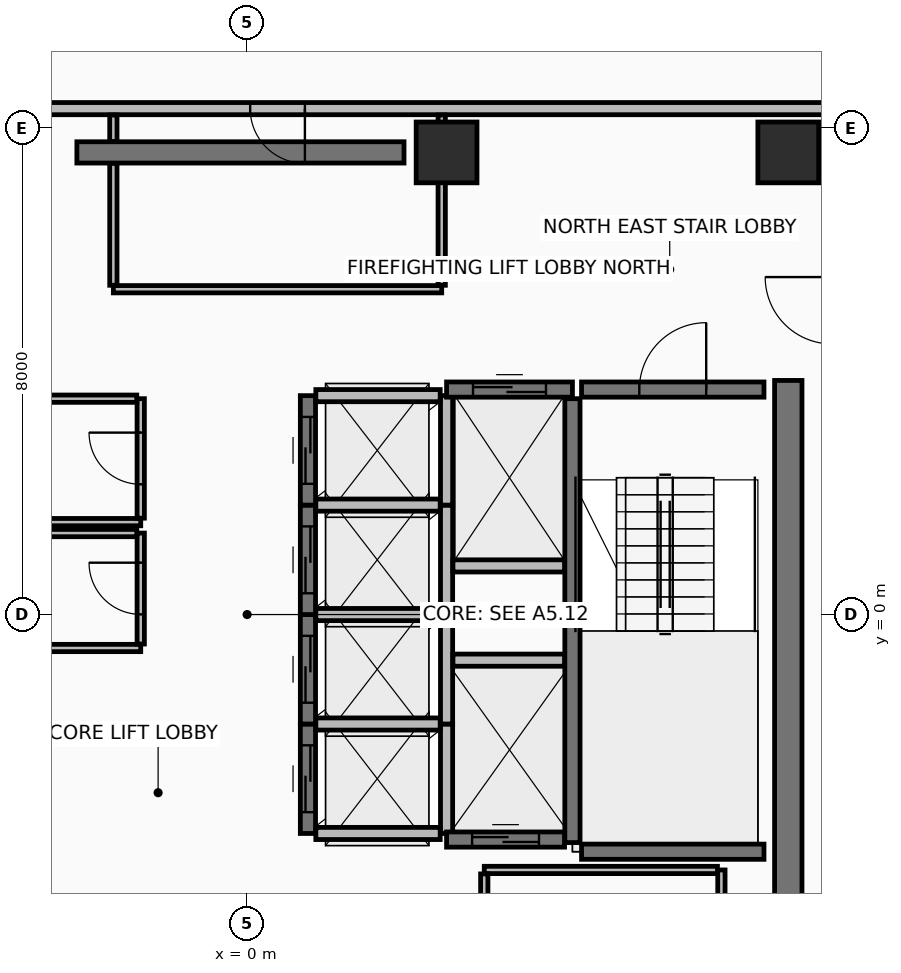
"""IFC4 building model, lengths in metres.
Left out: names, types, materials, properties, quantities, classifications, styles, units other than length and angle.
Written with IfcOpenShell. Run it as: python <this file> out.ifc"""

import sys

from ifc_helpers import new_model, si_unit, direction, frame, frame_2d, origin, origin_2d, place, context, subcontext, project, spatial, rectangle, extrude, element, fill, save


model = new_model("IFC4")
c1 = context("Model", 3, precision=1e-05, world=origin(), true_north=direction((0.0, 1.0)))
c2 = subcontext(c1, "Body", "Model", "MODEL_VIEW")
j1 = project(units=[si_unit("LENGTHUNIT", "METRE"), si_unit("PLANEANGLEUNIT", "RADIAN")], contexts=[c1])
p1 = place(None, origin())
s1 = spatial("IfcSite", under=j1, at=p1, CompositionType="ELEMENT")
p2 = place(p1, origin())
s2 = spatial("IfcBuilding", under=s1, at=p2, CompositionType="ELEMENT")
p3 = place(p2, frame((0.0, 0.0, 260.6)))
s3 = spatial("IfcBuildingStorey", under=s2, at=p3, CompositionType="ELEMENT", Elevation=260.6)
for number, where, z_axis, x_axis in (
    (1, (8.9, 7.6, 0.0), (0.0, 0.0, 1.0), (1.0, 0.0, 0.0)),
    (2, (3.28, 7.6, 0.0), (0.0, 0.0, 1.0), (1.0, 0.0, 0.0)),
):
    element("IfcColumn", number, at=place(p3, frame(where, z_axis=z_axis, x_axis=x_axis)), inside=s3, PredefinedType="COLUMN", context=c2, shape_type="SweptSolid", body=[
        extrude(rectangle(XDim=1.0, YDim=1.0, at=origin_2d()), origin(), (0.0, 0.0, 1.0), 3.6),
    ])
p4 = place(p3, frame((-2.8, 7.6, 0.0), z_axis=(0.0, 0.0, 1.0), x_axis=(1.0, 0.0, 0.0)))
e3 = element("IfcWall", 3, at=p4, inside=s3, PredefinedType="SHEAR", context=c2, shape_type="SweptSolid", body=[
    extrude(rectangle(XDim=5.38, YDim=0.35, at=frame_2d((2.69, 0.0))), origin(), (0.0, 0.0, 1.0), 3.42),
])
p5 = place(p3, frame((8.9, -6.85, 0.0), z_axis=(0.0, 0.0, 1.0), x_axis=(0.0, 1.0, 0.0)))
e4 = element("IfcWall", 4, at=p5, inside=s3, PredefinedType="SHEAR", context=c2, shape_type="SweptSolid", body=[
    extrude(rectangle(XDim=10.7, YDim=0.45, at=frame_2d((5.35, 0.0))), origin(), (0.0, 0.0, 1.0), 3.42),
])
p6 = place(p3, frame((9.62, 8.32, 0.0), z_axis=(0.0, 0.0, 1.0), x_axis=(-1.0, 0.0, 0.0)))
e5 = element("IfcWall", 5, at=p6, inside=s3, PredefinedType="PARTITIONING", context=c2, shape_type="SweptSolid", body=[
    extrude(rectangle(XDim=19.24, YDim=0.2, at=frame_2d((9.62, 0.0))), origin(), (0.0, 0.0, 1.0), 2.915),
])
p7 = place(p6, frame((8.67, 0.0, 0.0)))
e6 = element("IfcOpeningElement", 6, at=p7, cuts=e5, PredefinedType="OPENING", context=c2, shape_type="SweptSolid", body=[
    extrude(rectangle(XDim=0.9, YDim=2.1, at=frame_2d((0.45, 1.05))), frame((0.0, 0.11, 0.0), z_axis=(0.0, -1.0, 0.0), x_axis=(1.0, 0.0, 0.0)), (0.0, 0.0, 1.0), 0.22),
])
p8 = place(p6, frame((14.22, 0.0, 0.0)))
e7 = element("IfcOpeningElement", 7, at=p8, cuts=e5, PredefinedType="OPENING", context=c2, shape_type="SweptSolid", body=[
    extrude(rectangle(XDim=0.9, YDim=2.1, at=frame_2d((0.45, 1.05))), frame((0.0, 0.11, 0.0), z_axis=(0.0, -1.0, 0.0), x_axis=(1.0, 0.0, 0.0)), (0.0, 0.0, 1.0), 0.22),
])
p9 = place(p3, frame((5.35, -3.75, 0.0), z_axis=(0.0, 0.0, 1.0), x_axis=(0.0, 1.0, 0.0)))
e8 = element("IfcWall", 8, at=p9, inside=s3, PredefinedType="SHEAR", context=c2, shape_type="SweptSolid", body=[
    extrude(rectangle(XDim=7.3, YDim=0.25, at=frame_2d((3.65, 0.0))), origin(), (0.0, 0.0, 1.0), 3.42),
])
p10 = place(p3, frame((5.5, 3.7, 0.0), z_axis=(0.0, 0.0, 1.0), x_axis=(1.0, 0.0, 0.0)))
e9 = element("IfcWall", 9, at=p10, inside=s3, PredefinedType="SHEAR", context=c2, shape_type="SweptSolid", body=[
    extrude(rectangle(XDim=3.0, YDim=0.25, at=frame_2d((1.5, 0.0))), origin(), (0.0, 0.0, 1.0), 3.42),
])
p11 = place(p10, frame((0.95, 0.0, 0.0)))
e10 = element("IfcOpeningElement", 10, at=p11, cuts=e9, PredefinedType="OPENING", context=c2, shape_type="SweptSolid", body=[
    extrude(rectangle(XDim=1.1, YDim=2.15, at=frame_2d((0.55, 1.075))), frame((0.0, 0.135, 0.0), z_axis=(0.0, -1.0, 0.0), x_axis=(1.0, 0.0, 0.0)), (0.0, 0.0, 1.0), 0.27),
])
p12 = place(p3, frame((5.5, -3.9, 0.0), z_axis=(0.0, 0.0, 1.0), x_axis=(1.0, 0.0, 0.0)))
e11 = element("IfcWall", 11, at=p12, inside=s3, PredefinedType="SHEAR", context=c2, shape_type="SweptSolid", body=[
    extrude(rectangle(XDim=3.0, YDim=0.25, at=frame_2d((1.5, 0.0))), origin(), (0.0, 0.0, 1.0), 3.42),
])
p13 = place(p3, frame((1.0, -3.6, 0.0), z_axis=(0.0, 0.0, 1.0), x_axis=(0.0, 1.0, 0.0)))
e12 = element("IfcWall", 12, at=p13, inside=s3, PredefinedType="SHEAR", context=c2, shape_type="SweptSolid", body=[
    extrude(rectangle(XDim=1.8, YDim=0.25, at=frame_2d((0.9, 0.0))), origin(), (0.0, 0.0, 1.0), 3.42),
])
p14 = place(p13, frame((0.35, 0.0, 0.0)))
e13 = element("IfcOpeningElement", 13, at=p14, cuts=e12, PredefinedType="OPENING", context=c2, shape_type="SweptSolid", body=[
    extrude(rectangle(XDim=1.1, YDim=2.2, at=frame_2d((0.55, 1.1))), frame((0.0, 0.135, 0.0), z_axis=(0.0, -1.0, 0.0), x_axis=(1.0, 0.0, 0.0)), (0.0, 0.0, 1.0), 0.27),
])
p15 = place(p3, frame((3.28, -3.6, 0.0), z_axis=(0.0, 0.0, 1.0), x_axis=(0.0, 1.0, 0.0)))
e14 = element("IfcWall", 14, at=p15, inside=s3, PredefinedType="PARTITIONING", context=c2, shape_type="SweptSolid", body=[
    extrude(rectangle(XDim=1.8, YDim=0.2, at=frame_2d((0.9, 0.0))), origin(), (0.0, 0.0, 1.0), 3.42),
])
for number, where, z_axis, x_axis in (
    (15, (1.13, -3.6, 0.0), (0.0, 0.0, 1.0), (1.0, 0.0, 0.0)),
    (16, (1.13, -1.8, 0.0), (0.0, 0.0, 1.0), (1.0, 0.0, 0.0)),
):
    element("IfcWall", number, at=place(p3, frame(where, z_axis=z_axis, x_axis=x_axis)), inside=s3, PredefinedType="PARTITIONING", context=c2, shape_type="SweptSolid", body=[
        extrude(rectangle(XDim=2.045, YDim=0.2, at=frame_2d((1.022, 0.0))), origin(), (0.0, 0.0, 1.0), 3.42),
    ])
p16 = place(p3, frame((1.0, -1.8, 0.0), z_axis=(0.0, 0.0, 1.0), x_axis=(0.0, 1.0, 0.0)))
e17 = element("IfcWall", 17, at=p16, inside=s3, PredefinedType="SHEAR", context=c2, shape_type="SweptSolid", body=[
    extrude(rectangle(XDim=1.8, YDim=0.25, at=frame_2d((0.9, 0.0))), origin(), (0.0, 0.0, 1.0), 3.42),
])
p17 = place(p16, frame((0.35, 0.0, 0.0)))
e18 = element("IfcOpeningElement", 18, at=p17, cuts=e17, PredefinedType="OPENING", context=c2, shape_type="SweptSolid", body=[
    extrude(rectangle(XDim=1.1, YDim=2.2, at=frame_2d((0.55, 1.1))), frame((0.0, 0.135, 0.0), z_axis=(0.0, -1.0, 0.0), x_axis=(1.0, 0.0, 0.0)), (0.0, 0.0, 1.0), 0.27),
])
p18 = place(p3, frame((3.28, -1.8, 0.0), z_axis=(0.0, 0.0, 1.0), x_axis=(0.0, 1.0, 0.0)))
e19 = element("IfcWall", 19, at=p18, inside=s3, PredefinedType="PARTITIONING", context=c2, shape_type="SweptSolid", body=[
    extrude(rectangle(XDim=1.8, YDim=0.2, at=frame_2d((0.9, 0.0))), origin(), (0.0, 0.0, 1.0), 3.42),
])
p19 = place(p3, frame((1.13, 0.0, 0.0), z_axis=(0.0, 0.0, 1.0), x_axis=(1.0, 0.0, 0.0)))
e20 = element("IfcWall", 20, at=p19, inside=s3, PredefinedType="PARTITIONING", context=c2, shape_type="SweptSolid", body=[
    extrude(rectangle(XDim=2.045, YDim=0.2, at=frame_2d((1.022, 0.0))), origin(), (0.0, 0.0, 1.0), 3.42),
])
p20 = place(p3, frame((1.0, 0.0, 0.0), z_axis=(0.0, 0.0, 1.0), x_axis=(0.0, 1.0, 0.0)))
e21 = element("IfcWall", 21, at=p20, inside=s3, PredefinedType="SHEAR", context=c2, shape_type="SweptSolid", body=[
    extrude(rectangle(XDim=1.8, YDim=0.25, at=frame_2d((0.9, 0.0))), origin(), (0.0, 0.0, 1.0), 3.42),
])
p21 = place(p20, frame((0.35, 0.0, 0.0)))
e22 = element("IfcOpeningElement", 22, at=p21, cuts=e21, PredefinedType="OPENING", context=c2, shape_type="SweptSolid", body=[
    extrude(rectangle(XDim=1.1, YDim=2.2, at=frame_2d((0.55, 1.1))), frame((0.0, 0.135, 0.0), z_axis=(0.0, -1.0, 0.0), x_axis=(1.0, 0.0, 0.0)), (0.0, 0.0, 1.0), 0.27),
])
p22 = place(p3, frame((3.28, 0.0, 0.0), z_axis=(0.0, 0.0, 1.0), x_axis=(0.0, 1.0, 0.0)))
e23 = element("IfcWall", 23, at=p22, inside=s3, PredefinedType="PARTITIONING", context=c2, shape_type="SweptSolid", body=[
    extrude(rectangle(XDim=1.8, YDim=0.2, at=frame_2d((0.9, 0.0))), origin(), (0.0, 0.0, 1.0), 3.42),
])
p23 = place(p3, frame((1.13, 1.8, 0.0), z_axis=(0.0, 0.0, 1.0), x_axis=(1.0, 0.0, 0.0)))
e24 = element("IfcWall", 24, at=p23, inside=s3, PredefinedType="PARTITIONING", context=c2, shape_type="SweptSolid", body=[
    extrude(rectangle(XDim=2.045, YDim=0.2, at=frame_2d((1.022, 0.0))), origin(), (0.0, 0.0, 1.0), 3.42),
])
p24 = place(p3, frame((1.0, 1.8, 0.0), z_axis=(0.0, 0.0, 1.0), x_axis=(0.0, 1.0, 0.0)))
e25 = element("IfcWall", 25, at=p24, inside=s3, PredefinedType="SHEAR", context=c2, shape_type="SweptSolid", body=[
    extrude(rectangle(XDim=1.8, YDim=0.25, at=frame_2d((0.9, 0.0))), origin(), (0.0, 0.0, 1.0), 3.42),
])
p25 = place(p24, frame((0.35, 0.0, 0.0)))
e26 = element("IfcOpeningElement", 26, at=p25, cuts=e25, PredefinedType="OPENING", context=c2, shape_type="SweptSolid", body=[
    extrude(rectangle(XDim=1.1, YDim=2.2, at=frame_2d((0.55, 1.1))), frame((0.0, 0.135, 0.0), z_axis=(0.0, -1.0, 0.0), x_axis=(1.0, 0.0, 0.0)), (0.0, 0.0, 1.0), 0.27),
])
p26 = place(p3, frame((3.28, 1.8, 0.0), z_axis=(0.0, 0.0, 1.0), x_axis=(0.0, 1.0, 0.0)))
e27 = element("IfcWall", 27, at=p26, inside=s3, PredefinedType="PARTITIONING", context=c2, shape_type="SweptSolid", body=[
    extrude(rectangle(XDim=1.8, YDim=0.2, at=frame_2d((0.9, 0.0))), origin(), (0.0, 0.0, 1.0), 3.42),
])
p27 = place(p3, frame((1.13, 3.6, 0.0), z_axis=(0.0, 0.0, 1.0), x_axis=(1.0, 0.0, 0.0)))
e28 = element("IfcWall", 28, at=p27, inside=s3, PredefinedType="PARTITIONING", context=c2, shape_type="SweptSolid", body=[
    extrude(rectangle(XDim=2.045, YDim=0.2, at=frame_2d((1.022, 0.0))), origin(), (0.0, 0.0, 1.0), 2.715),
])
p28 = place(p3, frame((3.28, 3.7, 0.0), z_axis=(0.0, 0.0, 1.0), x_axis=(1.0, 0.0, 0.0)))
e29 = element("IfcWall", 29, at=p28, inside=s3, PredefinedType="SHEAR", context=c2, shape_type="SweptSolid", body=[
    extrude(rectangle(XDim=2.07, YDim=0.25, at=frame_2d((1.035, 0.0))), origin(), (0.0, 0.0, 1.0), 3.42),
])
p29 = place(p28, frame((0.435, 0.0, 0.0)))
e30 = element("IfcOpeningElement", 30, at=p29, cuts=e29, PredefinedType="OPENING", context=c2, shape_type="SweptSolid", body=[
    extrude(rectangle(XDim=1.2, YDim=2.2, at=frame_2d((0.6, 1.1))), frame((0.0, 0.135, 0.0), z_axis=(0.0, -1.0, 0.0), x_axis=(1.0, 0.0, 0.0)), (0.0, 0.0, 1.0), 0.27),
])
p30 = place(p3, frame((3.385, 0.8, 0.0), z_axis=(0.0, 0.0, 1.0), x_axis=(1.0, 0.0, 0.0)))
e31 = element("IfcWall", 31, at=p30, inside=s3, PredefinedType="PARTITIONING", context=c2, shape_type="SweptSolid", body=[
    extrude(rectangle(XDim=1.835, YDim=0.2, at=frame_2d((0.917, 0.0))), origin(), (0.0, 0.0, 1.0), 3.42),
])
p31 = place(p3, frame((3.28, -3.7, 0.0), z_axis=(0.0, 0.0, 1.0), x_axis=(1.0, 0.0, 0.0)))
e32 = element("IfcWall", 32, at=p31, inside=s3, PredefinedType="SHEAR", context=c2, shape_type="SweptSolid", body=[
    extrude(rectangle(XDim=1.94, YDim=0.25, at=frame_2d((0.97, 0.0))), origin(), (0.0, 0.0, 1.0), 3.42),
])
p32 = place(p31, frame((0.42, 0.0, 0.0)))
e33 = element("IfcOpeningElement", 33, at=p32, cuts=e32, PredefinedType="OPENING", context=c2, shape_type="SweptSolid", body=[
    extrude(rectangle(XDim=1.1, YDim=2.2, at=frame_2d((0.55, 1.1))), frame((0.0, 0.135, 0.0), z_axis=(0.0, -1.0, 0.0), x_axis=(1.0, 0.0, 0.0)), (0.0, 0.0, 1.0), 0.27),
])
p33 = place(p3, frame((3.385, -0.75, 0.0), z_axis=(0.0, 0.0, 1.0), x_axis=(1.0, 0.0, 0.0)))
e34 = element("IfcWall", 34, at=p33, inside=s3, PredefinedType="PARTITIONING", context=c2, shape_type="SweptSolid", body=[
    extrude(rectangle(XDim=1.835, YDim=0.2, at=frame_2d((0.917, 0.0))), origin(), (0.0, 0.0, 1.0), 3.42),
])
p34 = place(p3, frame((-5.22, 1.52, 0.0), z_axis=(0.0, 0.0, 1.0), x_axis=(1.0, 0.0, 0.0)))
e35 = element("IfcWall", 35, at=p34, inside=s3, PredefinedType="PARTITIONING", context=c2, shape_type="SweptSolid", body=[
    extrude(rectangle(XDim=3.47, YDim=0.12, at=frame_2d((1.735, 0.0))), origin(), (0.0, 0.0, 1.0), 3.42),
])
p35 = place(p3, frame((-1.75, 1.585, 0.0), z_axis=(0.0, 0.0, 1.0), x_axis=(0.0, 1.0, 0.0)))
e36 = element("IfcWall", 36, at=p35, inside=s3, PredefinedType="PARTITIONING", context=c2, shape_type="SweptSolid", body=[
    extrude(rectangle(XDim=1.965, YDim=0.12, at=frame_2d((0.982, 0.0))), origin(), (0.0, 0.0, 1.0), 3.42),
])
p36 = place(p35, frame((0.557, 0.0, 0.0)))
e37 = element("IfcOpeningElement", 37, at=p36, cuts=e36, PredefinedType="OPENING", context=c2, shape_type="SweptSolid", body=[
    extrude(rectangle(XDim=0.85, YDim=2.1, at=frame_2d((0.425, 1.05))), frame((0.0, 0.07, 0.0), z_axis=(0.0, -1.0, 0.0), x_axis=(1.0, 0.0, 0.0)), (0.0, 0.0, 1.0), 0.14),
])
p37 = place(p3, frame((-1.815, 3.55, 0.0), z_axis=(0.0, 0.0, 1.0), x_axis=(-1.0, 0.0, 0.0)))
e38 = element("IfcWall", 38, at=p37, inside=s3, PredefinedType="PARTITIONING", context=c2, shape_type="SweptSolid", body=[
    extrude(rectangle(XDim=3.405, YDim=0.12, at=frame_2d((1.703, 0.0))), origin(), (0.0, 0.0, 1.0), 3.42),
])
p38 = place(p3, frame((-5.22, -0.55, 0.0), z_axis=(0.0, 0.0, 1.0), x_axis=(1.0, 0.0, 0.0)))
e39 = element("IfcWall", 39, at=p38, inside=s3, PredefinedType="PARTITIONING", context=c2, shape_type="SweptSolid", body=[
    extrude(rectangle(XDim=3.47, YDim=0.12, at=frame_2d((1.735, 0.0))), origin(), (0.0, 0.0, 1.0), 3.42),
])
p39 = place(p3, frame((-1.75, -0.485, 0.0), z_axis=(0.0, 0.0, 1.0), x_axis=(0.0, 1.0, 0.0)))
e40 = element("IfcWall", 40, at=p39, inside=s3, PredefinedType="PARTITIONING", context=c2, shape_type="SweptSolid", body=[
    extrude(rectangle(XDim=1.825, YDim=0.12, at=frame_2d((0.913, 0.0))), origin(), (0.0, 0.0, 1.0), 3.42),
])
p40 = place(p39, frame((0.488, 0.0, 0.0)))
e41 = element("IfcOpeningElement", 41, at=p40, cuts=e40, PredefinedType="OPENING", context=c2, shape_type="SweptSolid", body=[
    extrude(rectangle(XDim=0.85, YDim=2.1, at=frame_2d((0.425, 1.05))), frame((0.0, 0.07, 0.0), z_axis=(0.0, -1.0, 0.0), x_axis=(1.0, 0.0, 0.0)), (0.0, 0.0, 1.0), 0.14),
])
p41 = place(p3, frame((-1.815, 1.34, 0.0), z_axis=(0.0, 0.0, 1.0), x_axis=(-1.0, 0.0, 0.0)))
e42 = element("IfcWall", 42, at=p41, inside=s3, PredefinedType="PARTITIONING", context=c2, shape_type="SweptSolid", body=[
    extrude(rectangle(XDim=3.405, YDim=0.12, at=frame_2d((1.703, 0.0))), origin(), (0.0, 0.0, 1.0), 3.42),
])
p42 = place(p3, frame((-2.2, 5.35, 0.0), z_axis=(0.0, 0.0, 1.0), x_axis=(1.0, 0.0, 0.0)))
e43 = element("IfcWall", 43, at=p42, inside=s3, PredefinedType="PARTITIONING", context=c2, shape_type="SweptSolid", body=[
    extrude(rectangle(XDim=5.4, YDim=0.12, at=frame_2d((2.7, 0.0))), origin(), (0.0, 0.0, 1.0), 2.715),
])
p43 = place(p3, frame((3.2, 5.415, 0.0), z_axis=(0.0, 0.0, 1.0), x_axis=(0.0, 1.0, 0.0)))
e44 = element("IfcWall", 44, at=p43, inside=s3, PredefinedType="PARTITIONING", context=c2, shape_type="SweptSolid", body=[
    extrude(rectangle(XDim=2.8, YDim=0.12, at=frame_2d((1.4, 0.0))), origin(), (0.0, 0.0, 1.0), 2.715),
])
p44 = place(p3, frame((-2.2, 8.215, 0.0), z_axis=(0.0, 0.0, 1.0), x_axis=(0.0, -1.0, 0.0)))
e45 = element("IfcWall", 45, at=p44, inside=s3, PredefinedType="PARTITIONING", context=c2, shape_type="SweptSolid", body=[
    extrude(rectangle(XDim=0.435, YDim=0.12, at=frame_2d((0.218, 0.0))), origin(), (0.0, 0.0, 1.0), 2.715),
])
p45 = place(p3, frame((-2.2, 7.42, 0.0), z_axis=(0.0, 0.0, 1.0), x_axis=(0.0, -1.0, 0.0)))
e46 = element("IfcWall", 46, at=p45, inside=s3, PredefinedType="PARTITIONING", context=c2, shape_type="SweptSolid", body=[
    extrude(rectangle(XDim=2.005, YDim=0.12, at=frame_2d((1.002, 0.0))), origin(), (0.0, 0.0, 1.0), 2.715),
])
p46 = place(p3, frame((7.8, -8.215, 0.0), z_axis=(0.0, 0.0, 1.0), x_axis=(0.0, 1.0, 0.0)))
e47 = element("IfcWall", 47, at=p46, inside=s3, PredefinedType="PARTITIONING", context=c2, shape_type="SweptSolid", body=[
    extrude(rectangle(XDim=4.015, YDim=0.12, at=frame_2d((2.008, 0.0))), origin(), (0.0, 0.0, 1.0), 2.715),
])
p47 = place(p3, frame((7.735, -4.2, 0.0), z_axis=(0.0, 0.0, 1.0), x_axis=(-1.0, 0.0, 0.0)))
e48 = element("IfcWall", 48, at=p47, inside=s3, PredefinedType="PARTITIONING", context=c2, shape_type="SweptSolid", body=[
    extrude(rectangle(XDim=3.835, YDim=0.12, at=frame_2d((1.917, 0.0))), origin(), (0.0, 0.0, 1.0), 3.42),
])
p48 = place(p3, frame((3.9, -4.265, 0.0), z_axis=(0.0, 0.0, 1.0), x_axis=(0.0, -1.0, 0.0)))
e49 = element("IfcWall", 49, at=p48, inside=s3, PredefinedType="PARTITIONING", context=c2, shape_type="SweptSolid", body=[
    extrude(rectangle(XDim=3.95, YDim=0.12, at=frame_2d((1.975, 0.0))), origin(), (0.0, 0.0, 1.0), 2.715),
])
p49 = place(p11, frame((1.1, 0.0, 0.0), z_axis=(0.0, 0.0, 1.0), x_axis=(-1.0, 0.0, 0.0)))
e50 = element("IfcDoor", 50, at=p49, inside=s3, OperationType="SINGLE_SWING_LEFT", PredefinedType="DOOR", context=c2, shape_type="SweptSolid", body=[
    extrude(rectangle(XDim=1.1, YDim=2.15, at=frame_2d((0.55, 1.075))), frame((0.0, 0.025, 0.0), z_axis=(0.0, -1.0, 0.0), x_axis=(1.0, 0.0, 0.0)), (0.0, 0.0, 1.0), 0.05),
])
fill(e10, e50)
p50 = place(p14, origin())
e51 = element("IfcDoor", 51, at=p50, inside=s3, OperationType="SLIDING_TO_LEFT", PredefinedType="DOOR", context=c2, shape_type="SweptSolid", body=[
    extrude(rectangle(XDim=1.1, YDim=2.2, at=frame_2d((0.55, 1.1))), frame((0.0, 0.025, 0.0), z_axis=(0.0, -1.0, 0.0), x_axis=(1.0, 0.0, 0.0)), (0.0, 0.0, 1.0), 0.05),
])
fill(e13, e51)
p51 = place(p17, origin())
e52 = element("IfcDoor", 52, at=p51, inside=s3, OperationType="SLIDING_TO_LEFT", PredefinedType="DOOR", context=c2, shape_type="SweptSolid", body=[
    extrude(rectangle(XDim=1.1, YDim=2.2, at=frame_2d((0.55, 1.1))), frame((0.0, 0.025, 0.0), z_axis=(0.0, -1.0, 0.0), x_axis=(1.0, 0.0, 0.0)), (0.0, 0.0, 1.0), 0.05),
])
fill(e18, e52)
p52 = place(p21, origin())
e53 = element("IfcDoor", 53, at=p52, inside=s3, OperationType="SLIDING_TO_LEFT", PredefinedType="DOOR", context=c2, shape_type="SweptSolid", body=[
    extrude(rectangle(XDim=1.1, YDim=2.2, at=frame_2d((0.55, 1.1))), frame((0.0, 0.025, 0.0), z_axis=(0.0, -1.0, 0.0), x_axis=(1.0, 0.0, 0.0)), (0.0, 0.0, 1.0), 0.05),
])
fill(e22, e53)
p53 = place(p25, origin())
e54 = element("IfcDoor", 54, at=p53, inside=s3, OperationType="SLIDING_TO_LEFT", PredefinedType="DOOR", context=c2, shape_type="SweptSolid", body=[
    extrude(rectangle(XDim=1.1, YDim=2.2, at=frame_2d((0.55, 1.1))), frame((0.0, 0.025, 0.0), z_axis=(0.0, -1.0, 0.0), x_axis=(1.0, 0.0, 0.0)), (0.0, 0.0, 1.0), 0.05),
])
fill(e26, e54)
p54 = place(p29, origin())
e55 = element("IfcDoor", 55, at=p54, inside=s3, OperationType="SLIDING_TO_RIGHT", PredefinedType="DOOR", context=c2, shape_type="SweptSolid", body=[
    extrude(rectangle(XDim=1.2, YDim=2.2, at=frame_2d((0.6, 1.1))), frame((0.0, 0.025, 0.0), z_axis=(0.0, -1.0, 0.0), x_axis=(1.0, 0.0, 0.0)), (0.0, 0.0, 1.0), 0.05),
])
fill(e30, e55)
p55 = place(p32, origin())
e56 = element("IfcDoor", 56, at=p55, inside=s3, OperationType="SLIDING_TO_LEFT", PredefinedType="DOOR", context=c2, shape_type="SweptSolid", body=[
    extrude(rectangle(XDim=1.1, YDim=2.2, at=frame_2d((0.55, 1.1))), frame((0.0, 0.025, 0.0), z_axis=(0.0, -1.0, 0.0), x_axis=(1.0, 0.0, 0.0)), (0.0, 0.0, 1.0), 0.05),
])
fill(e33, e56)
p56 = place(p36, frame((0.85, 0.0, 0.0), z_axis=(0.0, 0.0, 1.0), x_axis=(-1.0, 0.0, 0.0)))
e57 = element("IfcDoor", 57, at=p56, inside=s3, OperationType="SINGLE_SWING_RIGHT", PredefinedType="DOOR", context=c2, shape_type="SweptSolid", body=[
    extrude(rectangle(XDim=0.85, YDim=2.1, at=frame_2d((0.425, 1.05))), frame((0.0, 0.025, 0.0), z_axis=(0.0, -1.0, 0.0), x_axis=(1.0, 0.0, 0.0)), (0.0, 0.0, 1.0), 0.05),
])
fill(e37, e57)
p57 = place(p40, frame((0.85, 0.0, 0.0), z_axis=(0.0, 0.0, 1.0), x_axis=(-1.0, 0.0, 0.0)))
e58 = element("IfcDoor", 58, at=p57, inside=s3, OperationType="SINGLE_SWING_RIGHT", PredefinedType="DOOR", context=c2, shape_type="SweptSolid", body=[
    extrude(rectangle(XDim=0.85, YDim=2.1, at=frame_2d((0.425, 1.05))), frame((0.0, 0.025, 0.0), z_axis=(0.0, -1.0, 0.0), x_axis=(1.0, 0.0, 0.0)), (0.0, 0.0, 1.0), 0.05),
])
fill(e41, e58)
p58 = place(p7, origin())
e59 = element("IfcDoor", 59, at=p58, inside=s3, OperationType="SINGLE_SWING_LEFT", PredefinedType="DOOR", context=c2, shape_type="SweptSolid", body=[
    extrude(rectangle(XDim=0.9, YDim=2.1, at=frame_2d((0.45, 1.05))), frame((0.0, 0.025, 0.0), z_axis=(0.0, -1.0, 0.0), x_axis=(1.0, 0.0, 0.0)), (0.0, 0.0, 1.0), 0.05),
])
fill(e6, e59)
save(model, sys.argv[1])
